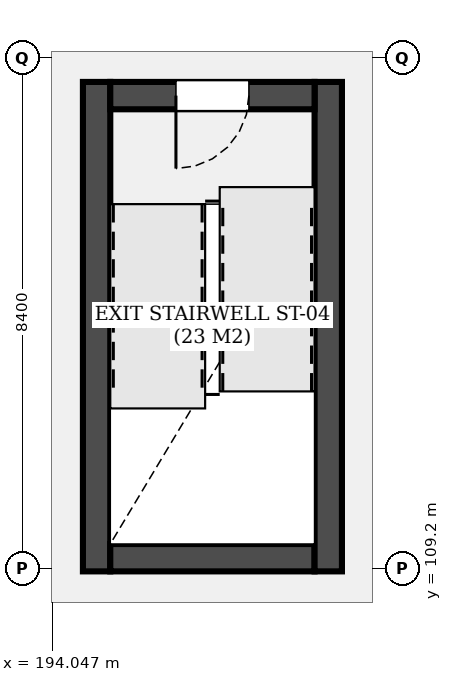
"""IFC4 building model, lengths in metres.
Left out: names, types, materials, properties, quantities, classifications, styles, units other than length and angle.
Written with IfcOpenShell. Run it as: python <this file> out.ifc"""

import sys

from ifc_helpers import new_model, si_unit, direction, frame, frame_2d, origin, place, context, subcontext, project, spatial, rectangle, extrude, element, fill, save


model = new_model("IFC4")
c1 = context("Model", 3, precision=1e-05, world=origin(), true_north=direction((0.0, 1.0)))
c2 = subcontext(c1, "Body", "Model", "MODEL_VIEW")
j1 = project(units=[si_unit("LENGTHUNIT", "METRE"), si_unit("PLANEANGLEUNIT", "RADIAN")], contexts=[c1])
p1 = place(None, origin())
s1 = spatial("IfcSite", under=j1, at=p1, CompositionType="ELEMENT")
p2 = place(p1, origin())
s2 = spatial("IfcBuilding", under=s1, at=p2, CompositionType="ELEMENT")
p3 = place(p2, frame((0.0, 0.0, 17.8)))
s3 = spatial("IfcBuildingStorey", under=s2, at=p3, CompositionType="ELEMENT", Elevation=17.8)
p4 = place(p3, frame((194.775, 117.2, 0.0), z_axis=(0.0, 0.0, 1.0), x_axis=(0.0, -1.0, 0.0)))
e1 = element("IfcWall", 1, at=p4, inside=s3, PredefinedType="SHEAR", context=c2, shape_type="SweptSolid", body=[
    extrude(rectangle(XDim=8.05, YDim=0.45, at=frame_2d((4.025, 0.0))), origin(), (0.0, 0.0, 1.0), 4.2),
])
p5 = place(p3, frame((195.0, 109.375, 0.0), z_axis=(0.0, 0.0, 1.0), x_axis=(1.0, 0.0, 0.0)))
e2 = element("IfcWall", 2, at=p5, inside=s3, PredefinedType="SHEAR", context=c2, shape_type="SweptSolid", body=[
    extrude(rectangle(XDim=3.36, YDim=0.45, at=frame_2d((1.68, 0.0))), origin(), (0.0, 0.0, 1.0), 4.2),
])
p6 = place(p3, frame((198.585, 109.15, 0.0), z_axis=(0.0, 0.0, 1.0), x_axis=(0.0, 1.0, 0.0)))
e3 = element("IfcWall", 3, at=p6, inside=s3, PredefinedType="SHEAR", context=c2, shape_type="SweptSolid", body=[
    extrude(rectangle(XDim=8.05, YDim=0.45, at=frame_2d((4.025, 0.0))), origin(), (0.0, 0.0, 1.0), 4.2),
])
p7 = place(p3, frame((198.36, 116.975, 0.0), z_axis=(0.0, 0.0, 1.0), x_axis=(-1.0, 0.0, 0.0)))
e4 = element("IfcWall", 4, at=p7, inside=s3, PredefinedType="SHEAR", context=c2, shape_type="SweptSolid", body=[
    extrude(rectangle(XDim=3.36, YDim=0.45, at=frame_2d((1.68, 0.0))), origin(), (0.0, 0.0, 1.0), 4.2),
])
p8 = place(p7, frame((1.08, 0.0, 0.0)))
e5 = element("IfcOpeningElement", 5, at=p8, cuts=e4, PredefinedType="OPENING", context=c2, shape_type="SweptSolid", body=[
    extrude(rectangle(XDim=1.2, YDim=2.2, at=frame_2d((0.6, 1.1))), frame((0.0, 0.235, 0.0), z_axis=(0.0, -1.0, 0.0), x_axis=(1.0, 0.0, 0.0)), (0.0, 0.0, 1.0), 0.47),
])
p9 = place(p8, origin())
e6 = element("IfcDoor", 6, at=p9, inside=s3, OperationType="SINGLE_SWING_RIGHT", PredefinedType="DOOR", context=c2, shape_type="SweptSolid", body=[
    extrude(rectangle(XDim=1.2, YDim=2.2, at=frame_2d((0.6, 1.1))), frame((0.0, 0.025, 0.0), z_axis=(0.0, -1.0, 0.0), x_axis=(1.0, 0.0, 0.0)), (0.0, 0.0, 1.0), 0.05),
])
fill(e5, e6)
save(model, sys.argv[1])
